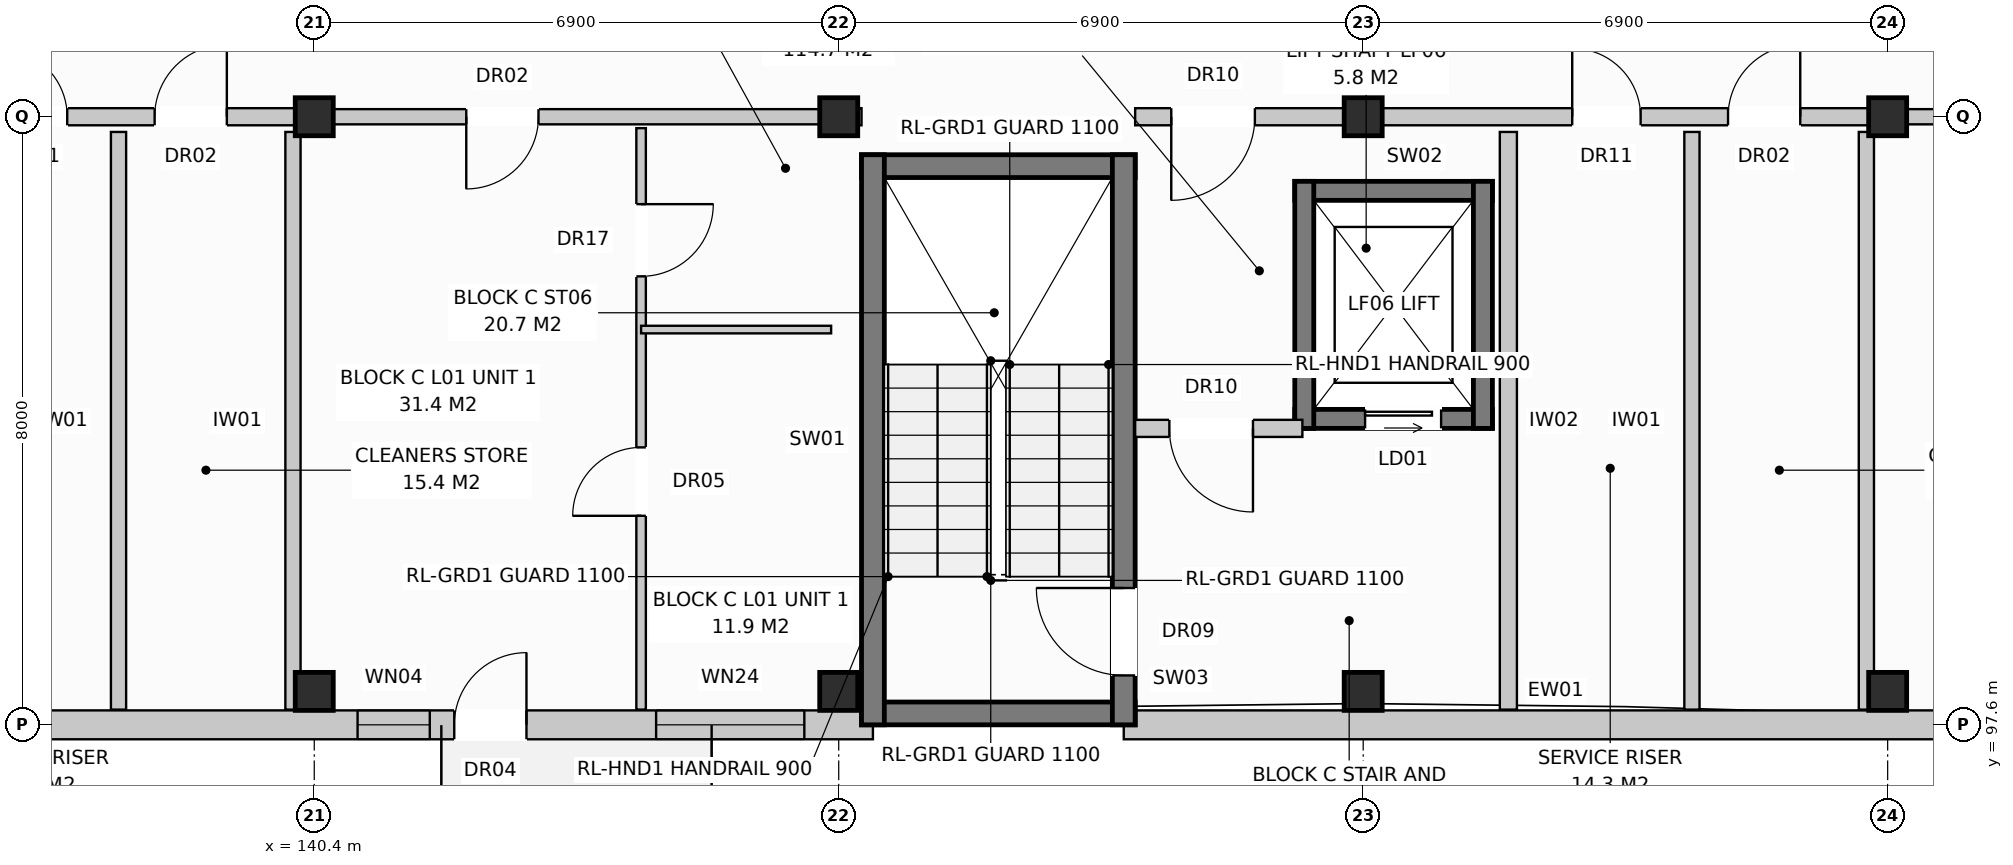
"""IFC4 building model, lengths in metres.
Left out: names, types, materials, properties, quantities, classifications, styles, units other than length and angle.
Written with IfcOpenShell. Run it as: python <this file> out.ifc"""

import sys

from ifc_helpers import new_model, si_unit, direction, frame, frame_2d, origin, origin_with_axes, origin_2d, place, context, subcontext, project, spatial, rectangle, extrude, element, fill, save


model = new_model("IFC4")
c1 = context("Model", 3, precision=1e-05, world=origin(), true_north=direction((0.0, 1.0)))
c2 = subcontext(c1, "Body", "Model", "MODEL_VIEW")
j1 = project(units=[si_unit("LENGTHUNIT", "METRE"), si_unit("PLANEANGLEUNIT", "RADIAN")], contexts=[c1])
p1 = place(None, origin())
s1 = spatial("IfcSite", under=j1, at=p1, CompositionType="ELEMENT")
p2 = place(p1, origin())
s2 = spatial("IfcBuilding", under=s1, at=p2, CompositionType="ELEMENT")
p3 = place(p2, frame((0.0, 0.0, 4.4)))
s3 = spatial("IfcBuildingStorey", under=s2, at=p3, CompositionType="ELEMENT", Elevation=4.4)
for number, where, z_axis, x_axis in (
    (1, (140.4, 98.04, 0.0), (0.0, 0.0, 1.0), (1.0, 0.0, 0.0)),
    (2, (140.4, 105.6, 0.0), (0.0, 0.0, 1.0), (1.0, 0.0, 0.0)),
    (3, (147.3, 98.04, 0.0), (0.0, 0.0, 1.0), (1.0, 0.0, 0.0)),
    (4, (147.3, 105.6, 0.0), (0.0, 0.0, 1.0), (1.0, 0.0, 0.0)),
    (5, (154.2, 98.04, 0.0), (0.0, 0.0, 1.0), (1.0, 0.0, 0.0)),
    (6, (154.2, 105.6, 0.0), (0.0, 0.0, 1.0), (1.0, 0.0, 0.0)),
    (7, (161.1, 98.04, 0.0), (0.0, 0.0, 1.0), (1.0, 0.0, 0.0)),
    (8, (161.1, 105.6, 0.0), (0.0, 0.0, 1.0), (1.0, 0.0, 0.0)),
):
    element("IfcColumn", number, at=place(p3, frame(where, z_axis=z_axis, x_axis=x_axis)), inside=s3, PredefinedType="COLUMN", context=c2, shape_type="SweptSolid", body=[
        extrude(rectangle(XDim=0.5, YDim=0.5, at=origin_2d()), origin(), (0.0, 0.0, 1.0), 3.6),
    ])
p4 = place(p3, frame((130.35, 97.6, 0.0), z_axis=(0.0, 0.0, 1.0), x_axis=(1.0, 0.0, 0.0)))
e9 = element("IfcWall", 9, at=p4, inside=s3, PredefinedType="STANDARD", context=c2, shape_type="SweptSolid", body=[
    extrude(rectangle(XDim=17.4, YDim=0.38, at=frame_2d((8.7, 0.0))), origin(), (0.0, 0.0, 1.0), 3.33),
])
p5 = place(p4, frame((11.892, 0.0, 0.0)))
e10 = element("IfcOpeningElement", 10, at=p5, cuts=e9, PredefinedType="OPENING", context=c2, shape_type="SweptSolid", body=[
    extrude(rectangle(XDim=0.95, YDim=2.1, at=frame_2d((0.475, 1.05))), frame((0.0, 0.202, 0.0), z_axis=(0.0, -1.0, 0.0), x_axis=(1.0, 0.0, 0.0)), (0.0, 0.0, 1.0), 0.404),
])
p6 = place(p4, frame((10.62, 0.0, 0.9)))
e11 = element("IfcOpeningElement", 11, at=p6, cuts=e9, PredefinedType="OPENING", context=c2, shape_type="SweptSolid", body=[
    extrude(rectangle(XDim=0.95, YDim=1.55, at=frame_2d((0.475, 0.775))), frame((0.0, 0.202, 0.0), z_axis=(0.0, -1.0, 0.0), x_axis=(1.0, 0.0, 0.0)), (0.0, 0.0, 1.0), 0.404),
])
p7 = place(p4, frame((14.548, 0.0, 0.8)))
e12 = element("IfcOpeningElement", 12, at=p7, cuts=e9, PredefinedType="OPENING", context=c2, shape_type="SweptSolid", body=[
    extrude(rectangle(XDim=1.95, YDim=1.65, at=frame_2d((0.975, 0.825))), frame((0.0, 0.202, 0.0), z_axis=(0.0, -1.0, 0.0), x_axis=(1.0, 0.0, 0.0)), (0.0, 0.0, 1.0), 0.404),
])
p8 = place(p3, frame((151.05, 97.6, 0.0), z_axis=(0.0, 0.0, 1.0), x_axis=(1.0, 0.0, 0.0)))
e13 = element("IfcWall", 13, at=p8, inside=s3, PredefinedType="STANDARD", context=c2, shape_type="SweptSolid", body=[
    extrude(rectangle(XDim=16.77, YDim=0.38, at=frame_2d((8.385, 0.0))), origin(), (0.0, 0.0, 1.0), 3.33),
])
p9 = place(p8, frame((11.12, 0.0, 0.8)))
e14 = element("IfcOpeningElement", 14, at=p9, cuts=e13, PredefinedType="OPENING", context=c2, shape_type="SweptSolid", body=[
    extrude(rectangle(XDim=1.8, YDim=1.7, at=frame_2d((0.9, 0.85))), frame((0.0, 0.202, 0.0), z_axis=(0.0, -1.0, 0.0), x_axis=(1.0, 0.0, 0.0)), (0.0, 0.0, 1.0), 0.404),
])
p10 = place(p8, frame((14.235, 0.0, 0.8)))
e15 = element("IfcOpeningElement", 15, at=p10, cuts=e13, PredefinedType="OPENING", context=c2, shape_type="SweptSolid", body=[
    extrude(rectangle(XDim=1.9, YDim=1.85, at=frame_2d((0.95, 0.925))), frame((0.0, 0.202, 0.0), z_axis=(0.0, -1.0, 0.0), x_axis=(1.0, 0.0, 0.0)), (0.0, 0.0, 1.0), 0.404),
])
for number, where, z_axis, x_axis in (
    (16, (137.825, 97.8, 0.0), (0.0, 0.0, 1.0), (0.0, 1.0, 0.0)),
    (17, (140.12, 97.8, 0.0), (0.0, 0.0, 1.0), (0.0, 1.0, 0.0)),
):
    element("IfcWall", number, at=place(p3, frame(where, z_axis=z_axis, x_axis=x_axis)), inside=s3, PredefinedType="PARTITIONING", context=c2, shape_type="SweptSolid", body=[
        extrude(rectangle(XDim=7.6, YDim=0.2, at=frame_2d((3.8, 0.0))), origin(), (0.0, 0.0, 1.0), 3.33),
    ])
p11 = place(p3, frame((130.5, 105.6, 0.0), z_axis=(0.0, 0.0, 1.0), x_axis=(1.0, 0.0, 0.0)))
e18 = element("IfcWall", 18, at=p11, inside=s3, PredefinedType="PARTITIONING", context=c2, shape_type="SweptSolid", body=[
    extrude(rectangle(XDim=9.9, YDim=0.225, at=frame_2d((4.95, 0.0))), origin(), (0.0, 0.0, 1.0), 2.77),
])
p12 = place(p11, frame((0.475, 0.0, 0.0)))
e19 = element("IfcOpeningElement", 19, at=p12, cuts=e18, PredefinedType="OPENING", context=c2, shape_type="SweptSolid", body=[
    extrude(rectangle(XDim=1.1, YDim=2.15, at=frame_2d((0.55, 1.075))), frame((0.0, 0.125, 0.0), z_axis=(0.0, -1.0, 0.0), x_axis=(1.0, 0.0, 0.0)), (0.0, 0.0, 1.0), 0.249),
])
p13 = place(p11, frame((5.75, 0.0, 0.0)))
e20 = element("IfcOpeningElement", 20, at=p13, cuts=e18, PredefinedType="OPENING", context=c2, shape_type="SweptSolid", body=[
    extrude(rectangle(XDim=0.9, YDim=2.1, at=frame_2d((0.45, 1.05))), frame((0.0, 0.125, 0.0), z_axis=(0.0, -1.0, 0.0), x_axis=(1.0, 0.0, 0.0)), (0.0, 0.0, 1.0), 0.249),
])
p14 = place(p11, frame((7.8, 0.0, 0.0)))
e21 = element("IfcOpeningElement", 21, at=p14, cuts=e18, PredefinedType="OPENING", context=c2, shape_type="SweptSolid", body=[
    extrude(rectangle(XDim=0.95, YDim=2.15, at=frame_2d((0.475, 1.075))), frame((0.0, 0.125, 0.0), z_axis=(0.0, -1.0, 0.0), x_axis=(1.0, 0.0, 0.0)), (0.0, 0.0, 1.0), 0.249),
])
for number, where, z_axis, x_axis in (
    (22, (147.6, 97.75, 0.0), (0.0, 0.0, 1.0), (1.0, 0.0, 0.0)),
    (23, (147.6, 104.95, 0.0), (0.0, 0.0, 1.0), (1.0, 0.0, 0.0)),
):
    element("IfcWall", number, at=place(p3, frame(where, z_axis=z_axis, x_axis=x_axis)), inside=s3, PredefinedType="SHEAR", context=c2, shape_type="SweptSolid", body=[
        extrude(rectangle(XDim=3.6, YDim=0.3, at=frame_2d((1.8, 0.0))), origin(), (0.0, 0.0, 1.0), 3.33),
    ])
p15 = place(p3, frame((147.75, 97.6, 0.0), z_axis=(0.0, 0.0, 1.0), x_axis=(0.0, 1.0, 0.0)))
e24 = element("IfcWall", 24, at=p15, inside=s3, PredefinedType="SHEAR", context=c2, shape_type="SweptSolid", body=[
    extrude(rectangle(XDim=7.5, YDim=0.3, at=frame_2d((3.75, 0.0))), origin(), (0.0, 0.0, 1.0), 3.33),
])
p16 = place(p3, frame((151.05, 97.6, 0.0), z_axis=(0.0, 0.0, 1.0), x_axis=(0.0, 1.0, 0.0)))
e25 = element("IfcWall", 25, at=p16, inside=s3, PredefinedType="SHEAR", context=c2, shape_type="SweptSolid", body=[
    extrude(rectangle(XDim=7.5, YDim=0.3, at=frame_2d((3.75, 0.0))), origin(), (0.0, 0.0, 1.0), 3.33),
])
p17 = place(p16, frame((0.65, 0.0, 0.0)))
e26 = element("IfcOpeningElement", 26, at=p17, cuts=e25, PredefinedType="OPENING", context=c2, shape_type="SweptSolid", body=[
    extrude(rectangle(XDim=1.15, YDim=2.15, at=frame_2d((0.575, 1.075))), frame((0.0, 0.162, 0.0), z_axis=(0.0, -1.0, 0.0), x_axis=(1.0, 0.0, 0.0)), (0.0, 0.0, 1.0), 0.324),
])
p18 = place(p3, frame((153.3, 101.625, 0.0), z_axis=(0.0, 0.0, 1.0), x_axis=(1.0, 0.0, 0.0)))
e27 = element("IfcWall", 27, at=p18, inside=s3, PredefinedType="SHEAR", context=c2, shape_type="SweptSolid", body=[
    extrude(rectangle(XDim=2.6, YDim=0.25, at=frame_2d((1.3, 0.0))), origin(), (0.0, 0.0, 1.0), 3.33),
])
p19 = place(p18, frame((0.925, 0.0, 0.0)))
e28 = element("IfcOpeningElement", 28, at=p19, cuts=e27, PredefinedType="OPENING", context=c2, shape_type="SweptSolid", body=[
    extrude(rectangle(XDim=1.0, YDim=2.1, at=frame_2d((0.5, 1.05))), frame((0.0, 0.137, 0.0), z_axis=(0.0, -1.0, 0.0), x_axis=(1.0, 0.0, 0.0)), (0.0, 0.0, 1.0), 0.274),
])
p20 = place(p3, frame((153.3, 104.625, 0.0), z_axis=(0.0, 0.0, 1.0), x_axis=(1.0, 0.0, 0.0)))
e29 = element("IfcWall", 29, at=p20, inside=s3, PredefinedType="SHEAR", context=c2, shape_type="SweptSolid", body=[
    extrude(rectangle(XDim=2.6, YDim=0.25, at=frame_2d((1.3, 0.0))), origin(), (0.0, 0.0, 1.0), 3.33),
])
for number, where, z_axis, x_axis in (
    (30, (153.425, 101.5, 0.0), (0.0, 0.0, 1.0), (0.0, 1.0, 0.0)),
    (31, (155.775, 101.5, 0.0), (0.0, 0.0, 1.0), (0.0, 1.0, 0.0)),
):
    element("IfcWall", number, at=place(p3, frame(where, z_axis=z_axis, x_axis=x_axis)), inside=s3, PredefinedType="SHEAR", context=c2, shape_type="SweptSolid", body=[
        extrude(rectangle(XDim=3.25, YDim=0.25, at=frame_2d((1.625, 0.0))), origin(), (0.0, 0.0, 1.0), 3.33),
    ])
p21 = place(p3, frame((156.11, 97.8, 0.0), z_axis=(0.0, 0.0, 1.0), x_axis=(0.0, 1.0, 0.0)))
e32 = element("IfcWall", 32, at=p21, inside=s3, PredefinedType="PARTITIONING", context=c2, shape_type="SweptSolid", body=[
    extrude(rectangle(XDim=7.6, YDim=0.225, at=frame_2d((3.8, 0.0))), origin(), (0.0, 0.0, 1.0), 2.99),
])
p22 = place(p3, frame((151.2, 101.5, 0.0), z_axis=(0.0, 0.0, 1.0), x_axis=(1.0, 0.0, 0.0)))
e33 = element("IfcWall", 33, at=p22, inside=s3, PredefinedType="PARTITIONING", context=c2, shape_type="SweptSolid", body=[
    extrude(rectangle(XDim=2.2, YDim=0.225, at=frame_2d((1.1, 0.0))), origin(), (0.0, 0.0, 1.0), 3.33),
])
p23 = place(p22, frame((0.45, 0.0, 0.0)))
e34 = element("IfcOpeningElement", 34, at=p23, cuts=e33, PredefinedType="OPENING", context=c2, shape_type="SweptSolid", body=[
    extrude(rectangle(XDim=1.1, YDim=2.15, at=frame_2d((0.55, 1.075))), frame((0.0, 0.125, 0.0), z_axis=(0.0, -1.0, 0.0), x_axis=(1.0, 0.0, 0.0)), (0.0, 0.0, 1.0), 0.249),
])
p24 = place(p3, frame((147.3, 105.6, 0.0), z_axis=(0.0, 0.0, 1.0), x_axis=(1.0, 0.0, 0.0)))
e35 = element("IfcWall", 35, at=p24, inside=s3, PredefinedType="PARTITIONING", context=c2, shape_type="SweptSolid", body=[
    extrude(rectangle(XDim=0.3, YDim=0.225, at=frame_2d((0.15, 0.0))), origin(), (0.0, 0.0, 1.0), 3.33),
])
p25 = place(p3, frame((158.525, 97.8, 0.0), z_axis=(0.0, 0.0, 1.0), x_axis=(0.0, 1.0, 0.0)))
e36 = element("IfcWall", 36, at=p25, inside=s3, PredefinedType="PARTITIONING", context=c2, shape_type="SweptSolid", body=[
    extrude(rectangle(XDim=7.6, YDim=0.2, at=frame_2d((3.8, 0.0))), origin(), (0.0, 0.0, 1.0), 3.33),
])
p26 = place(p3, frame((160.82, 97.8, 0.0), z_axis=(0.0, 0.0, 1.0), x_axis=(0.0, 1.0, 0.0)))
e37 = element("IfcWall", 37, at=p26, inside=s3, PredefinedType="PARTITIONING", context=c2, shape_type="SweptSolid", body=[
    extrude(rectangle(XDim=7.6, YDim=0.2, at=frame_2d((3.8, 0.0))), origin(), (0.0, 0.0, 1.0), 2.77),
])
p27 = place(p3, frame((151.2, 105.6, 0.0), z_axis=(0.0, 0.0, 1.0), x_axis=(1.0, 0.0, 0.0)))
e38 = element("IfcWall", 38, at=p27, inside=s3, PredefinedType="PARTITIONING", context=c2, shape_type="SweptSolid", body=[
    extrude(rectangle(XDim=9.9, YDim=0.225, at=frame_2d((4.95, 0.0))), origin(), (0.0, 0.0, 1.0), 2.77),
])
p28 = place(p27, frame((0.475, 0.0, 0.0)))
e39 = element("IfcOpeningElement", 39, at=p28, cuts=e38, PredefinedType="OPENING", context=c2, shape_type="SweptSolid", body=[
    extrude(rectangle(XDim=1.1, YDim=2.15, at=frame_2d((0.55, 1.075))), frame((0.0, 0.125, 0.0), z_axis=(0.0, -1.0, 0.0), x_axis=(1.0, 0.0, 0.0)), (0.0, 0.0, 1.0), 0.249),
])
p29 = place(p27, frame((5.75, 0.0, 0.0)))
e40 = element("IfcOpeningElement", 40, at=p29, cuts=e38, PredefinedType="OPENING", context=c2, shape_type="SweptSolid", body=[
    extrude(rectangle(XDim=0.9, YDim=2.1, at=frame_2d((0.45, 1.05))), frame((0.0, 0.125, 0.0), z_axis=(0.0, -1.0, 0.0), x_axis=(1.0, 0.0, 0.0)), (0.0, 0.0, 1.0), 0.249),
])
p30 = place(p27, frame((7.8, 0.0, 0.0)))
e41 = element("IfcOpeningElement", 41, at=p30, cuts=e38, PredefinedType="OPENING", context=c2, shape_type="SweptSolid", body=[
    extrude(rectangle(XDim=0.95, YDim=2.15, at=frame_2d((0.475, 1.075))), frame((0.0, 0.125, 0.0), z_axis=(0.0, -1.0, 0.0), x_axis=(1.0, 0.0, 0.0)), (0.0, 0.0, 1.0), 0.249),
])
p31 = place(p3, frame((140.4, 105.6, 0.0), z_axis=(0.0, 0.0, 1.0), x_axis=(1.0, 0.0, 0.0)))
e42 = element("IfcWall", 42, at=p31, inside=s3, PredefinedType="PARTITIONING", context=c2, shape_type="SweptSolid", body=[
    extrude(rectangle(XDim=6.9, YDim=0.2, at=frame_2d((3.45, 0.0))), origin(), (0.0, 0.0, 1.0), 2.77),
])
p32 = place(p31, frame((2.0, 0.0, 0.0)))
e43 = element("IfcOpeningElement", 43, at=p32, cuts=e42, PredefinedType="OPENING", context=c2, shape_type="SweptSolid", body=[
    extrude(rectangle(XDim=0.95, YDim=2.15, at=frame_2d((0.475, 1.075))), frame((0.0, 0.112, 0.0), z_axis=(0.0, -1.0, 0.0), x_axis=(1.0, 0.0, 0.0)), (0.0, 0.0, 1.0), 0.224),
])
p33 = place(p3, frame((144.7, 105.45, 0.0), z_axis=(0.0, 0.0, 1.0), x_axis=(0.0, -1.0, 0.0)))
e44 = element("IfcWall", 44, at=p33, inside=s3, PredefinedType="PARTITIONING", context=c2, shape_type="SweptSolid", body=[
    extrude(rectangle(XDim=7.65, YDim=0.125, at=frame_2d((3.825, 0.0))), origin(), (0.0, 0.0, 1.0), 3.33),
])
p34 = place(p33, frame((1.0, 0.0, 0.0)))
e45 = element("IfcOpeningElement", 45, at=p34, cuts=e44, PredefinedType="OPENING", context=c2, shape_type="SweptSolid", body=[
    extrude(rectangle(XDim=0.95, YDim=2.1, at=frame_2d((0.475, 1.05))), frame((0.0, 0.074, 0.0), z_axis=(0.0, -1.0, 0.0), x_axis=(1.0, 0.0, 0.0)), (0.0, 0.0, 1.0), 0.149),
])
p35 = place(p33, frame((4.2, 0.0, 0.0)))
e46 = element("IfcOpeningElement", 46, at=p35, cuts=e44, PredefinedType="OPENING", context=c2, shape_type="SweptSolid", body=[
    extrude(rectangle(XDim=0.9, YDim=2.1, at=frame_2d((0.45, 1.05))), frame((0.0, 0.074, 0.0), z_axis=(0.0, -1.0, 0.0), x_axis=(1.0, 0.0, 0.0)), (0.0, 0.0, 1.0), 0.149),
])
p36 = place(p3, frame((144.7, 102.8, 0.0), z_axis=(0.0, 0.0, 1.0), x_axis=(1.0, 0.0, 0.0)))
e47 = element("IfcWall", 47, at=p36, inside=s3, PredefinedType="PARTITIONING", context=c2, shape_type="SweptSolid", body=[
    extrude(rectangle(XDim=2.5, YDim=0.1, at=frame_2d((1.25, 0.0))), origin(), (0.0, 0.0, 1.0), 3.33),
])
p37 = place(p3, frame((161.1, 105.6, 0.0), z_axis=(0.0, 0.0, 1.0), x_axis=(1.0, 0.0, 0.0)))
e48 = element("IfcWall", 48, at=p37, inside=s3, PredefinedType="PARTITIONING", context=c2, shape_type="SweptSolid", body=[
    extrude(rectangle(XDim=6.9, YDim=0.2, at=frame_2d((3.45, 0.0))), origin(), (0.0, 0.0, 1.0), 2.77),
])
p38 = place(p37, frame((2.0, 0.0, 0.0)))
e49 = element("IfcOpeningElement", 49, at=p38, cuts=e48, PredefinedType="OPENING", context=c2, shape_type="SweptSolid", body=[
    extrude(rectangle(XDim=0.95, YDim=2.15, at=frame_2d((0.475, 1.075))), frame((0.0, 0.112, 0.0), z_axis=(0.0, -1.0, 0.0), x_axis=(1.0, 0.0, 0.0)), (0.0, 0.0, 1.0), 0.224),
])
p39 = place(p5, origin_with_axes())
e50 = element("IfcDoor", 50, at=p39, inside=s3, OperationType="SINGLE_SWING_RIGHT", PredefinedType="DOOR", context=c2, shape_type="SweptSolid", body=[
    extrude(rectangle(XDim=0.95, YDim=2.1, at=frame_2d((0.475, 1.05))), frame((0.0, 0.025, 0.0), z_axis=(0.0, -1.0, 0.0), x_axis=(1.0, 0.0, 0.0)), (0.0, 0.0, 1.0), 0.05),
])
fill(e10, e50)
p40 = place(p6, origin_with_axes())
e51 = element("IfcWindow", 51, at=p40, inside=s3, PartitioningType="SINGLE_PANEL", PredefinedType="WINDOW", context=c2, shape_type="SweptSolid", body=[
    extrude(rectangle(XDim=0.95, YDim=1.55, at=frame_2d((0.475, 0.775))), frame((0.0, 0.03, 0.0), z_axis=(0.0, -1.0, 0.0), x_axis=(1.0, 0.0, 0.0)), (0.0, 0.0, 1.0), 0.06),
])
fill(e11, e51)
p41 = place(p7, origin_with_axes())
e52 = element("IfcWindow", 52, at=p41, inside=s3, PartitioningType="SINGLE_PANEL", PredefinedType="WINDOW", context=c2, shape_type="SweptSolid", body=[
    extrude(rectangle(XDim=1.95, YDim=1.65, at=frame_2d((0.975, 0.825))), frame((0.0, 0.03, 0.0), z_axis=(0.0, -1.0, 0.0), x_axis=(1.0, 0.0, 0.0)), (0.0, 0.0, 1.0), 0.06),
])
fill(e12, e52)
p42 = place(p13, origin_with_axes())
e53 = element("IfcDoor", 53, at=p42, inside=s3, OperationType="SINGLE_SWING_LEFT", PredefinedType="DOOR", context=c2, shape_type="SweptSolid", body=[
    extrude(rectangle(XDim=0.9, YDim=2.1, at=frame_2d((0.45, 1.05))), frame((0.0, 0.025, 0.0), z_axis=(0.0, -1.0, 0.0), x_axis=(1.0, 0.0, 0.0)), (0.0, 0.0, 1.0), 0.05),
])
fill(e20, e53)
p43 = place(p14, origin_with_axes())
e54 = element("IfcDoor", 54, at=p43, inside=s3, OperationType="SINGLE_SWING_RIGHT", PredefinedType="DOOR", context=c2, shape_type="SweptSolid", body=[
    extrude(rectangle(XDim=0.95, YDim=2.15, at=frame_2d((0.475, 1.075))), frame((0.0, 0.025, 0.0), z_axis=(0.0, -1.0, 0.0), x_axis=(1.0, 0.0, 0.0)), (0.0, 0.0, 1.0), 0.05),
])
fill(e21, e54)
p44 = place(p17, origin_with_axes())
e55 = element("IfcDoor", 55, at=p44, inside=s3, OperationType="SINGLE_SWING_RIGHT", PredefinedType="DOOR", context=c2, shape_type="SweptSolid", body=[
    extrude(rectangle(XDim=1.15, YDim=2.15, at=frame_2d((0.575, 1.075))), frame((0.0, 0.025, 0.0), z_axis=(0.0, -1.0, 0.0), x_axis=(1.0, 0.0, 0.0)), (0.0, 0.0, 1.0), 0.05),
])
fill(e26, e55)
p45 = place(p19, origin_with_axes())
e56 = element("IfcDoor", 56, at=p45, inside=s3, OperationType="SLIDING_TO_LEFT", PredefinedType="DOOR", context=c2, shape_type="SweptSolid", body=[
    extrude(rectangle(XDim=1.0, YDim=2.1, at=frame_2d((0.5, 1.05))), frame((0.0, 0.025, 0.0), z_axis=(0.0, -1.0, 0.0), x_axis=(1.0, 0.0, 0.0)), (0.0, 0.0, 1.0), 0.05),
])
fill(e28, e56)
p46 = place(p23, frame((1.1, 0.0, 0.0), z_axis=(0.0, 0.0, 1.0), x_axis=(-1.0, 0.0, 0.0)))
e57 = element("IfcDoor", 57, at=p46, inside=s3, OperationType="SINGLE_SWING_RIGHT", PredefinedType="DOOR", context=c2, shape_type="SweptSolid", body=[
    extrude(rectangle(XDim=1.1, YDim=2.15, at=frame_2d((0.55, 1.075))), frame((0.0, 0.025, 0.0), z_axis=(0.0, -1.0, 0.0), x_axis=(1.0, 0.0, 0.0)), (0.0, 0.0, 1.0), 0.05),
])
fill(e34, e57)
p47 = place(p28, frame((1.1, 0.0, 0.0), z_axis=(0.0, 0.0, 1.0), x_axis=(-1.0, 0.0, 0.0)))
e58 = element("IfcDoor", 58, at=p47, inside=s3, OperationType="SINGLE_SWING_LEFT", PredefinedType="DOOR", context=c2, shape_type="SweptSolid", body=[
    extrude(rectangle(XDim=1.1, YDim=2.15, at=frame_2d((0.55, 1.075))), frame((0.0, 0.025, 0.0), z_axis=(0.0, -1.0, 0.0), x_axis=(1.0, 0.0, 0.0)), (0.0, 0.0, 1.0), 0.05),
])
fill(e39, e58)
p48 = place(p29, origin_with_axes())
e59 = element("IfcDoor", 59, at=p48, inside=s3, OperationType="SINGLE_SWING_LEFT", PredefinedType="DOOR", context=c2, shape_type="SweptSolid", body=[
    extrude(rectangle(XDim=0.9, YDim=2.1, at=frame_2d((0.45, 1.05))), frame((0.0, 0.025, 0.0), z_axis=(0.0, -1.0, 0.0), x_axis=(1.0, 0.0, 0.0)), (0.0, 0.0, 1.0), 0.05),
])
fill(e40, e59)
p49 = place(p30, origin_with_axes())
e60 = element("IfcDoor", 60, at=p49, inside=s3, OperationType="SINGLE_SWING_RIGHT", PredefinedType="DOOR", context=c2, shape_type="SweptSolid", body=[
    extrude(rectangle(XDim=0.95, YDim=2.15, at=frame_2d((0.475, 1.075))), frame((0.0, 0.025, 0.0), z_axis=(0.0, -1.0, 0.0), x_axis=(1.0, 0.0, 0.0)), (0.0, 0.0, 1.0), 0.05),
])
fill(e41, e60)
p50 = place(p32, frame((0.95, 0.0, 0.0), z_axis=(0.0, 0.0, 1.0), x_axis=(-1.0, 0.0, 0.0)))
e61 = element("IfcDoor", 61, at=p50, inside=s3, OperationType="SINGLE_SWING_LEFT", PredefinedType="DOOR", context=c2, shape_type="SweptSolid", body=[
    extrude(rectangle(XDim=0.95, YDim=2.15, at=frame_2d((0.475, 1.075))), frame((0.0, 0.025, 0.0), z_axis=(0.0, -1.0, 0.0), x_axis=(1.0, 0.0, 0.0)), (0.0, 0.0, 1.0), 0.05),
])
fill(e43, e61)
p51 = place(p34, origin_with_axes())
e62 = element("IfcDoor", 62, at=p51, inside=s3, OperationType="SINGLE_SWING_LEFT", PredefinedType="DOOR", context=c2, shape_type="SweptSolid", body=[
    extrude(rectangle(XDim=0.95, YDim=2.1, at=frame_2d((0.475, 1.05))), frame((0.0, 0.025, 0.0), z_axis=(0.0, -1.0, 0.0), x_axis=(1.0, 0.0, 0.0)), (0.0, 0.0, 1.0), 0.05),
])
fill(e45, e62)
p52 = place(p35, frame((0.9, 0.0, 0.0), z_axis=(0.0, 0.0, 1.0), x_axis=(-1.0, 0.0, 0.0)))
e63 = element("IfcDoor", 63, at=p52, inside=s3, OperationType="SINGLE_SWING_RIGHT", PredefinedType="DOOR", context=c2, shape_type="SweptSolid", body=[
    extrude(rectangle(XDim=0.9, YDim=2.1, at=frame_2d((0.45, 1.05))), frame((0.0, 0.025, 0.0), z_axis=(0.0, -1.0, 0.0), x_axis=(1.0, 0.0, 0.0)), (0.0, 0.0, 1.0), 0.05),
])
fill(e46, e63)
save(model, sys.argv[1])
